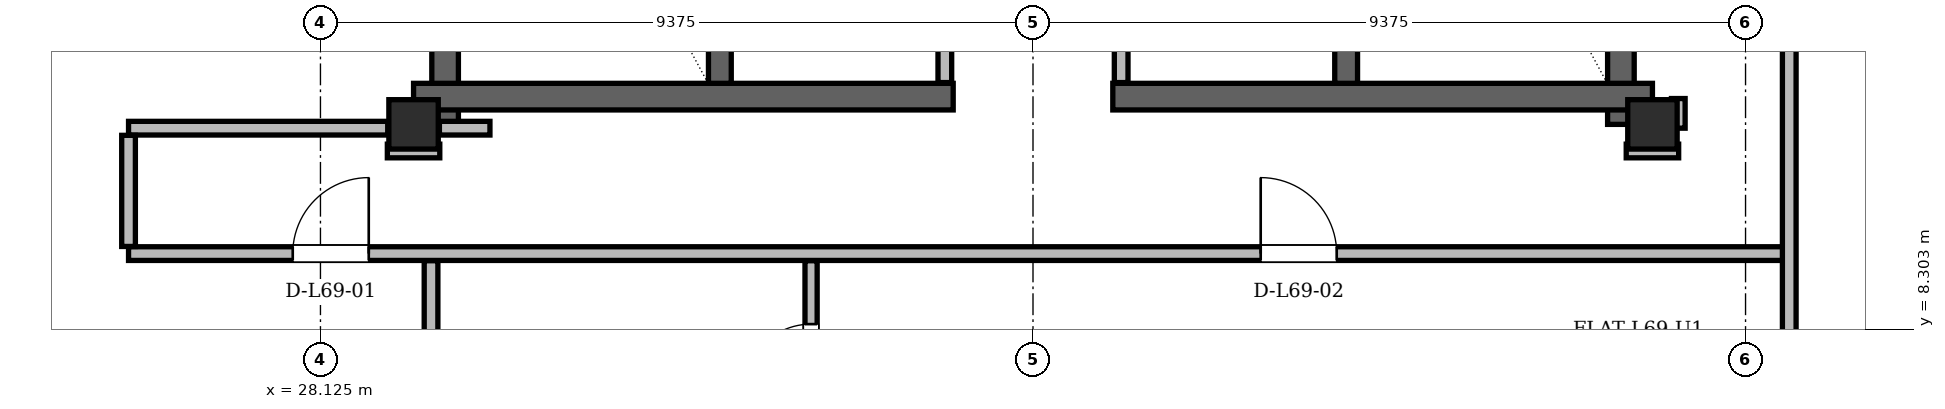
"""IFC4 building model, lengths in metres.
Left out: names, types, materials, properties, quantities, classifications, styles, units other than length and angle.
Written with IfcOpenShell. Run it as: python <this file> out.ifc"""

import sys

from ifc_helpers import new_model, si_unit, direction, frame, frame_2d, origin, origin_2d, place, context, subcontext, project, spatial, rectangle, hollow_rectangle, extrude, element, fill, save


model = new_model("IFC4")
c1 = context("Model", 3, precision=1e-05, world=origin(), true_north=direction((0.0, 1.0)))
c2 = subcontext(c1, "Body", "Model", "MODEL_VIEW")
j1 = project(units=[si_unit("LENGTHUNIT", "METRE"), si_unit("PLANEANGLEUNIT", "RADIAN")], contexts=[c1])
p1 = place(None, origin())
s1 = spatial("IfcSite", under=j1, at=p1, CompositionType="ELEMENT")
p2 = place(p1, origin())
s2 = spatial("IfcBuilding", under=s1, at=p2, CompositionType="ELEMENT")
p3 = place(p2, frame((0.0, 0.0, 261.6)))
s3 = spatial("IfcBuildingStorey", under=s2, at=p3, CompositionType="ELEMENT", Elevation=261.6)
for number, where, z_axis, x_axis in (
    (1, (29.35, 11.0, 0.0), (0.0, 0.0, 1.0), (1.0, 0.0, 0.0)),
    (2, (45.65, 11.0, 0.0), (0.0, 0.0, 1.0), (1.0, 0.0, 0.0)),
):
    element("IfcColumn", number, at=place(p3, frame(where, z_axis=z_axis, x_axis=x_axis)), inside=s3, PredefinedType="COLUMN", context=c2, shape_type="SweptSolid", body=[
        extrude(hollow_rectangle(XDim=0.65, YDim=0.65, WallThickness=0.05, at=origin_2d()), origin(), (0.0, 0.0, 1.0), 3.9),
    ])
for number, where, z_axis, x_axis in (
    (3, (29.765, 11.0, 0.0), (0.0, 0.0, 1.0), (0.0, 1.0, 0.0)),
    (4, (45.235, 11.0, 0.0), (0.0, 0.0, 1.0), (0.0, 1.0, 0.0)),
):
    element("IfcWall", number, at=place(p3, frame(where, z_axis=z_axis, x_axis=x_axis)), inside=s3, PredefinedType="SHEAR", context=c2, shape_type="SweptSolid", body=[
        extrude(rectangle(XDim=13.3, YDim=0.35, at=frame_2d((6.65, 0.0))), origin(), (0.0, 0.0, 1.0), 3.68),
    ])
for number, where, z_axis, x_axis in (
    (5, (29.35, 11.365, 0.0), (0.0, 0.0, 1.0), (1.0, 0.0, 0.0)),
    (6, (38.55, 11.365, 0.0), (0.0, 0.0, 1.0), (1.0, 0.0, 0.0)),
):
    element("IfcWall", number, at=place(p3, frame(where, z_axis=z_axis, x_axis=x_axis)), inside=s3, PredefinedType="SHEAR", context=c2, shape_type="SweptSolid", body=[
        extrude(rectangle(XDim=7.1, YDim=0.35, at=frame_2d((3.55, 0.0))), origin(), (0.0, 0.0, 1.0), 3.68),
    ])
for number, where, z_axis, x_axis in (
    (7, (33.38, 11.54, 0.0), (0.0, 0.0, 1.0), (0.0, 1.0, 0.0)),
    (8, (41.62, 11.54, 0.0), (0.0, 0.0, 1.0), (0.0, 1.0, 0.0)),
):
    element("IfcWall", number, at=place(p3, frame(where, z_axis=z_axis, x_axis=x_axis)), inside=s3, PredefinedType="SHEAR", context=c2, shape_type="SweptSolid", body=[
        extrude(rectangle(XDim=7.62, YDim=0.3, at=frame_2d((3.81, 0.0))), origin(), (0.0, 0.0, 1.0), 3.68),
    ])
p4 = place(p3, frame((58.652, 10.835, 0.0), z_axis=(0.0, 0.0, 1.0), x_axis=(-0.500002906693, 0.866023725598, 0.0)))
e9 = element("IfcWall", 9, at=p4, inside=s3, PredefinedType="SOLIDWALL", context=c2, shape_type="SweptSolid", body=[
    extrude(rectangle(XDim=37.2, YDim=0.29, at=frame_2d((18.6, 0.0))), origin(), (0.0, 0.0, 1.0), 3.058),
])
p5 = place(p4, frame((6.774, 0.0, 0.0)))
e10 = element("IfcOpeningElement", 10, at=p5, cuts=e9, PredefinedType="OPENING", context=c2, shape_type="SweptSolid", body=[
    extrude(rectangle(XDim=1.5, YDim=2.2, at=frame_2d((0.75, 1.1))), frame((0.0, 0.145, 0.0), z_axis=(0.0, -1.0, 0.0), x_axis=(1.0, 0.0, 0.0)), (0.0, 0.0, 1.0), 0.29),
])
p6 = place(p4, frame((32.061, 0.0, 0.0)))
e11 = element("IfcOpeningElement", 11, at=p6, cuts=e9, PredefinedType="OPENING", context=c2, shape_type="SweptSolid", body=[
    extrude(rectangle(XDim=1.5, YDim=2.2, at=frame_2d((0.75, 1.1))), frame((0.0, 0.145, 0.0), z_axis=(0.0, -1.0, 0.0), x_axis=(1.0, 0.0, 0.0)), (0.0, 0.0, 1.0), 0.29),
])
p7 = place(p4, frame((12.689, 0.0, 0.85)))
e12 = element("IfcOpeningElement", 12, at=p7, cuts=e9, PredefinedType="OPENING", context=c2, shape_type="SweptSolid", body=[
    extrude(rectangle(XDim=1.6, YDim=1.7, at=frame_2d((0.8, 0.85))), frame((0.0, 0.145, 0.0), z_axis=(0.0, -1.0, 0.0), x_axis=(1.0, 0.0, 0.0)), (0.0, 0.0, 1.0), 0.29),
])
p8 = place(p4, frame((16.599, 0.0, 0.85)))
e13 = element("IfcOpeningElement", 13, at=p8, cuts=e9, PredefinedType="OPENING", context=c2, shape_type="SweptSolid", body=[
    extrude(rectangle(XDim=3.0, YDim=2.098, at=frame_2d((1.5, 1.049))), frame((0.0, 0.145, 0.0), z_axis=(0.0, -1.0, 0.0), x_axis=(1.0, 0.0, 0.0)), (0.0, 0.0, 1.0), 0.29),
])
p9 = place(p4, frame((1.24, 0.0, 0.85)))
e14 = element("IfcOpeningElement", 14, at=p9, cuts=e9, PredefinedType="OPENING", context=c2, shape_type="SweptSolid", body=[
    extrude(rectangle(XDim=1.2, YDim=1.48, at=frame_2d((0.6, 0.74))), frame((0.0, 0.145, 0.0), z_axis=(0.0, -1.0, 0.0), x_axis=(1.0, 0.0, 0.0)), (0.0, 0.0, 1.0), 0.29),
])
p10 = place(p4, frame((3.566, 0.0, 0.85)))
e15 = element("IfcOpeningElement", 15, at=p10, cuts=e9, PredefinedType="OPENING", context=c2, shape_type="SweptSolid", body=[
    extrude(rectangle(XDim=1.2, YDim=1.48, at=frame_2d((0.6, 0.74))), frame((0.0, 0.145, 0.0), z_axis=(0.0, -1.0, 0.0), x_axis=(1.0, 0.0, 0.0)), (0.0, 0.0, 1.0), 0.29),
])
p11 = place(p4, frame((22.917, 0.0, 0.85)))
e16 = element("IfcOpeningElement", 16, at=p11, cuts=e9, PredefinedType="OPENING", context=c2, shape_type="SweptSolid", body=[
    extrude(rectangle(XDim=1.6, YDim=1.7, at=frame_2d((0.8, 0.85))), frame((0.0, 0.145, 0.0), z_axis=(0.0, -1.0, 0.0), x_axis=(1.0, 0.0, 0.0)), (0.0, 0.0, 1.0), 0.29),
])
p12 = place(p4, frame((27.025, 0.0, 0.85)))
e17 = element("IfcOpeningElement", 17, at=p12, cuts=e9, PredefinedType="OPENING", context=c2, shape_type="SweptSolid", body=[
    extrude(rectangle(XDim=3.0, YDim=2.098, at=frame_2d((1.5, 1.049))), frame((0.0, 0.145, 0.0), z_axis=(0.0, -1.0, 0.0), x_axis=(1.0, 0.0, 0.0)), (0.0, 0.0, 1.0), 0.29),
])
p13 = place(p4, frame((34.508, 0.0, 0.85)))
e18 = element("IfcOpeningElement", 18, at=p13, cuts=e9, PredefinedType="OPENING", context=c2, shape_type="SweptSolid", body=[
    extrude(rectangle(XDim=1.2, YDim=1.48, at=frame_2d((0.6, 0.74))), frame((0.0, 0.145, 0.0), z_axis=(0.0, -1.0, 0.0), x_axis=(1.0, 0.0, 0.0)), (0.0, 0.0, 1.0), 0.29),
])
p14 = place(p3, frame((34.948, 43.051, 0.0), z_axis=(0.0, 0.0, 1.0), x_axis=(-0.500002906693, -0.866023725598, 0.0)))
e19 = element("IfcWall", 19, at=p14, inside=s3, PredefinedType="SOLIDWALL", context=c2, shape_type="SweptSolid", body=[
    extrude(rectangle(XDim=37.2, YDim=0.29, at=frame_2d((18.6, 0.0))), origin(), (0.0, 0.0, 1.0), 3.058),
])
p15 = place(p14, frame((8.034, 0.0, 0.0)))
e20 = element("IfcOpeningElement", 20, at=p15, cuts=e19, PredefinedType="OPENING", context=c2, shape_type="SweptSolid", body=[
    extrude(rectangle(XDim=1.5, YDim=2.2, at=frame_2d((0.75, 1.1))), frame((0.0, 0.145, 0.0), z_axis=(0.0, -1.0, 0.0), x_axis=(1.0, 0.0, 0.0)), (0.0, 0.0, 1.0), 0.29),
])
p16 = place(p14, frame((32.061, 0.0, 0.0)))
e21 = element("IfcOpeningElement", 21, at=p16, cuts=e19, PredefinedType="OPENING", context=c2, shape_type="SweptSolid", body=[
    extrude(rectangle(XDim=1.5, YDim=2.2, at=frame_2d((0.75, 1.1))), frame((0.0, 0.145, 0.0), z_axis=(0.0, -1.0, 0.0), x_axis=(1.0, 0.0, 0.0)), (0.0, 0.0, 1.0), 0.29),
])
p17 = place(p14, frame((35.104, 0.0, 0.85)))
e22 = element("IfcOpeningElement", 22, at=p17, cuts=e19, PredefinedType="OPENING", context=c2, shape_type="SweptSolid", body=[
    extrude(rectangle(XDim=1.2, YDim=1.48, at=frame_2d((0.6, 0.74))), frame((0.0, 0.145, 0.0), z_axis=(0.0, -1.0, 0.0), x_axis=(1.0, 0.0, 0.0)), (0.0, 0.0, 1.0), 0.29),
])
p18 = place(p14, frame((12.597, 0.0, 0.85)))
e23 = element("IfcOpeningElement", 23, at=p18, cuts=e19, PredefinedType="OPENING", context=c2, shape_type="SweptSolid", body=[
    extrude(rectangle(XDim=2.0, YDim=1.8, at=frame_2d((1.0, 0.9))), frame((0.0, 0.145, 0.0), z_axis=(0.0, -1.0, 0.0), x_axis=(1.0, 0.0, 0.0)), (0.0, 0.0, 1.0), 0.29),
])
p19 = place(p14, frame((20.995, 0.0, 0.85)))
e24 = element("IfcOpeningElement", 24, at=p19, cuts=e19, PredefinedType="OPENING", context=c2, shape_type="SweptSolid", body=[
    extrude(rectangle(XDim=1.4, YDim=1.6, at=frame_2d((0.7, 0.8))), frame((0.0, 0.145, 0.0), z_axis=(0.0, -1.0, 0.0), x_axis=(1.0, 0.0, 0.0)), (0.0, 0.0, 1.0), 0.29),
])
p20 = place(p14, frame((27.454, 0.0, 0.85)))
e25 = element("IfcOpeningElement", 25, at=p20, cuts=e19, PredefinedType="OPENING", context=c2, shape_type="SweptSolid", body=[
    extrude(rectangle(XDim=1.2, YDim=1.48, at=frame_2d((0.6, 0.74))), frame((0.0, 0.145, 0.0), z_axis=(0.0, -1.0, 0.0), x_axis=(1.0, 0.0, 0.0)), (0.0, 0.0, 1.0), 0.29),
])
p21 = place(p14, frame((2.415, 0.0, 0.85)))
e26 = element("IfcOpeningElement", 26, at=p21, cuts=e19, PredefinedType="OPENING", context=c2, shape_type="SweptSolid", body=[
    extrude(rectangle(XDim=2.6, YDim=1.95, at=frame_2d((1.3, 0.975))), frame((0.0, 0.145, 0.0), z_axis=(0.0, -1.0, 0.0), x_axis=(1.0, 0.0, 0.0)), (0.0, 0.0, 1.0), 0.29),
])
p22 = place(p3, frame((36.34, 11.55, 0.0), z_axis=(0.0, 0.0, 1.0), x_axis=(0.0, 1.0, 0.0)))
e27 = element("IfcWall", 27, at=p22, inside=s3, PredefinedType="PARTITIONING", context=c2, shape_type="SweptSolid", body=[
    extrude(rectangle(XDim=5.55, YDim=0.18, at=frame_2d((2.775, 0.0))), origin(), (0.0, 0.0, 1.0), 3.68),
])
p23 = place(p22, frame((2.85, 0.0, 0.0)))
e28 = element("IfcOpeningElement", 28, at=p23, cuts=e27, PredefinedType="OPENING", context=c2, shape_type="SweptSolid", body=[
    extrude(rectangle(XDim=0.95, YDim=2.1, at=frame_2d((0.475, 1.05))), frame((0.0, 0.09, 0.0), z_axis=(0.0, -1.0, 0.0), x_axis=(1.0, 0.0, 0.0)), (0.0, 0.0, 1.0), 0.18),
])
p24 = place(p3, frame((38.66, 11.55, 0.0), z_axis=(0.0, 0.0, 1.0), x_axis=(0.0, 1.0, 0.0)))
e29 = element("IfcWall", 29, at=p24, inside=s3, PredefinedType="PARTITIONING", context=c2, shape_type="SweptSolid", body=[
    extrude(rectangle(XDim=5.55, YDim=0.18, at=frame_2d((2.775, 0.0))), origin(), (0.0, 0.0, 1.0), 3.68),
])
p25 = place(p24, frame((2.0, 0.0, 0.0)))
e30 = element("IfcOpeningElement", 30, at=p25, cuts=e29, PredefinedType="OPENING", context=c2, shape_type="SweptSolid", body=[
    extrude(rectangle(XDim=0.95, YDim=2.1, at=frame_2d((0.475, 1.05))), frame((0.0, 0.09, 0.0), z_axis=(0.0, -1.0, 0.0), x_axis=(1.0, 0.0, 0.0)), (0.0, 0.0, 1.0), 0.18),
])
p26 = place(p3, frame((25.6, 9.3, 0.0), z_axis=(0.0, 0.0, 1.0), x_axis=(1.0, 0.0, 0.0)))
e31 = element("IfcWall", 31, at=p26, inside=s3, PredefinedType="PARTITIONING", context=c2, shape_type="SweptSolid", body=[
    extrude(rectangle(XDim=21.85, YDim=0.18, at=frame_2d((10.925, 0.0))), origin(), (0.0, 0.0, 1.0), 3.68),
])
p27 = place(p26, frame((2.16, 0.0, 0.0)))
e32 = element("IfcOpeningElement", 32, at=p27, cuts=e31, PredefinedType="OPENING", context=c2, shape_type="SweptSolid", body=[
    extrude(rectangle(XDim=1.0, YDim=2.18, at=frame_2d((0.5, 1.09))), frame((0.0, 0.09, 0.0), z_axis=(0.0, -1.0, 0.0), x_axis=(1.0, 0.0, 0.0)), (0.0, 0.0, 1.0), 0.18),
])
p28 = place(p26, frame((14.896, 0.0, 0.0)))
e33 = element("IfcOpeningElement", 33, at=p28, cuts=e31, PredefinedType="OPENING", context=c2, shape_type="SweptSolid", body=[
    extrude(rectangle(XDim=1.0, YDim=2.18, at=frame_2d((0.5, 1.09))), frame((0.0, 0.09, 0.0), z_axis=(0.0, -1.0, 0.0), x_axis=(1.0, 0.0, 0.0)), (0.0, 0.0, 1.0), 0.18),
])
for number, where, z_axis, x_axis in (
    (34, (29.005, 10.65, 0.0), (0.0, 0.0, 1.0), (1.0, 0.0, 0.0)),
    (35, (45.305, 10.65, 0.0), (0.0, 0.0, 1.0), (1.0, 0.0, 0.0)),
):
    element("IfcWall", number, at=place(p3, frame(where, z_axis=z_axis, x_axis=x_axis)), inside=s3, PredefinedType="PARTITIONING", context=c2, shape_type="SweptSolid", body=[
        extrude(rectangle(XDim=0.69, YDim=0.18, at=frame_2d((0.345, 0.0))), origin(), (0.0, 0.0, 1.0), 3.68),
    ])
p29 = place(p3, frame((25.6, 10.95, 0.0), z_axis=(0.0, 0.0, 1.0), x_axis=(1.0, 0.0, 0.0)))
e36 = element("IfcWall", 36, at=p29, inside=s3, PredefinedType="PARTITIONING", context=c2, shape_type="SweptSolid", body=[
    extrude(rectangle(XDim=3.41, YDim=0.18, at=frame_2d((1.705, 0.0))), origin(), (0.0, 0.0, 1.0), 3.266),
])
p30 = place(p3, frame((29.69, 10.95, 0.0), z_axis=(0.0, 0.0, 1.0), x_axis=(1.0, 0.0, 0.0)))
e37 = element("IfcWall", 37, at=p30, inside=s3, PredefinedType="PARTITIONING", context=c2, shape_type="SweptSolid", body=[
    extrude(rectangle(XDim=0.665, YDim=0.18, at=frame_2d((0.333, 0.0))), origin(), (0.0, 0.0, 1.0), 2.82),
])
p31 = place(p3, frame((25.6, 9.394, 0.0), z_axis=(0.0, 0.0, 1.0), x_axis=(0.0, 1.0, 0.0)))
e38 = element("IfcWall", 38, at=p31, inside=s3, PredefinedType="PARTITIONING", context=c2, shape_type="SweptSolid", body=[
    extrude(rectangle(XDim=1.462, YDim=0.18, at=frame_2d((0.731, 0.0))), origin(), (0.0, 0.0, 1.0), 3.68),
])
p32 = place(p3, frame((29.58, 6.563, 0.0), z_axis=(0.0, 0.0, 1.0), x_axis=(0.0, 1.0, 0.0)))
e39 = element("IfcWall", 39, at=p32, inside=s3, PredefinedType="PARTITIONING", context=c2, shape_type="SweptSolid", body=[
    extrude(rectangle(XDim=2.643, YDim=0.18, at=frame_2d((1.321, 0.0))), origin(), (0.0, 0.0, 1.0), 3.68),
])
p33 = place(p3, frame((34.58, 6.563, 0.0), z_axis=(0.0, 0.0, 1.0), x_axis=(0.0, 1.0, 0.0)))
e40 = element("IfcWall", 40, at=p33, inside=s3, PredefinedType="PARTITIONING", context=c2, shape_type="SweptSolid", body=[
    extrude(rectangle(XDim=2.643, YDim=0.16, at=frame_2d((1.321, 0.0))), origin(), (0.0, 0.0, 1.0), 3.68),
])
p34 = place(p33, frame((0.929, 0.0, 0.0)))
e41 = element("IfcOpeningElement", 41, at=p34, cuts=e40, PredefinedType="OPENING", context=c2, shape_type="SweptSolid", body=[
    extrude(rectangle(XDim=0.88, YDim=2.08, at=frame_2d((0.44, 1.04))), frame((0.0, 0.08, 0.0), z_axis=(0.0, -1.0, 0.0), x_axis=(1.0, 0.0, 0.0)), (0.0, 0.0, 1.0), 0.16),
])
p35 = place(p3, frame((45.99, 10.95, 0.0), z_axis=(0.0, 0.0, 1.0), x_axis=(0.0, 1.0, 0.0)))
e42 = element("IfcWall", 42, at=p35, inside=s3, PredefinedType="PARTITIONING", context=c2, shape_type="SweptSolid", body=[
    extrude(rectangle(XDim=0.39, YDim=0.18, at=frame_2d((0.195, 0.0))), origin(), (0.0, 0.0, 1.0), 3.68),
])
p36 = place(p3, frame((47.45, 6.563, 0.0), z_axis=(0.0, 0.0, 1.0), x_axis=(0.0, 1.0, 0.0)))
e43 = element("IfcWall", 43, at=p36, inside=s3, PredefinedType="PARTITIONING", context=c2, shape_type="SweptSolid", body=[
    extrude(rectangle(XDim=23.376, YDim=0.18, at=frame_2d((11.688, 0.0))), origin(), (0.0, 0.0, 1.0), 3.058),
])
p37 = place(p36, frame((10.497, 0.0, 0.0)))
e44 = element("IfcOpeningElement", 44, at=p37, cuts=e43, PredefinedType="OPENING", context=c2, shape_type="SweptSolid", body=[
    extrude(rectangle(XDim=1.0, YDim=2.18, at=frame_2d((0.5, 1.09))), frame((0.0, 0.09, 0.0), z_axis=(0.0, -1.0, 0.0), x_axis=(1.0, 0.0, 0.0)), (0.0, 0.0, 1.0), 0.18),
])
p38 = place(p27, origin())
e45 = element("IfcDoor", 45, at=p38, inside=s3, OperationType="SINGLE_SWING_RIGHT", PredefinedType="DOOR", context=c2, shape_type="SweptSolid", body=[
    extrude(rectangle(XDim=1.0, YDim=2.18, at=frame_2d((0.5, 1.09))), frame((0.0, 0.025, 0.0), z_axis=(0.0, -1.0, 0.0), x_axis=(1.0, 0.0, 0.0)), (0.0, 0.0, 1.0), 0.05),
])
fill(e32, e45)
p39 = place(p28, origin())
e46 = element("IfcDoor", 46, at=p39, inside=s3, OperationType="SINGLE_SWING_LEFT", PredefinedType="DOOR", context=c2, shape_type="SweptSolid", body=[
    extrude(rectangle(XDim=1.0, YDim=2.18, at=frame_2d((0.5, 1.09))), frame((0.0, 0.025, 0.0), z_axis=(0.0, -1.0, 0.0), x_axis=(1.0, 0.0, 0.0)), (0.0, 0.0, 1.0), 0.05),
])
fill(e33, e46)
p40 = place(p34, origin())
e47 = element("IfcDoor", 47, at=p40, inside=s3, OperationType="SINGLE_SWING_LEFT", PredefinedType="DOOR", context=c2, shape_type="SweptSolid", body=[
    extrude(rectangle(XDim=0.88, YDim=2.08, at=frame_2d((0.44, 1.04))), frame((0.0, 0.025, 0.0), z_axis=(0.0, -1.0, 0.0), x_axis=(1.0, 0.0, 0.0)), (0.0, 0.0, 1.0), 0.05),
])
fill(e41, e47)
save(model, sys.argv[1])
